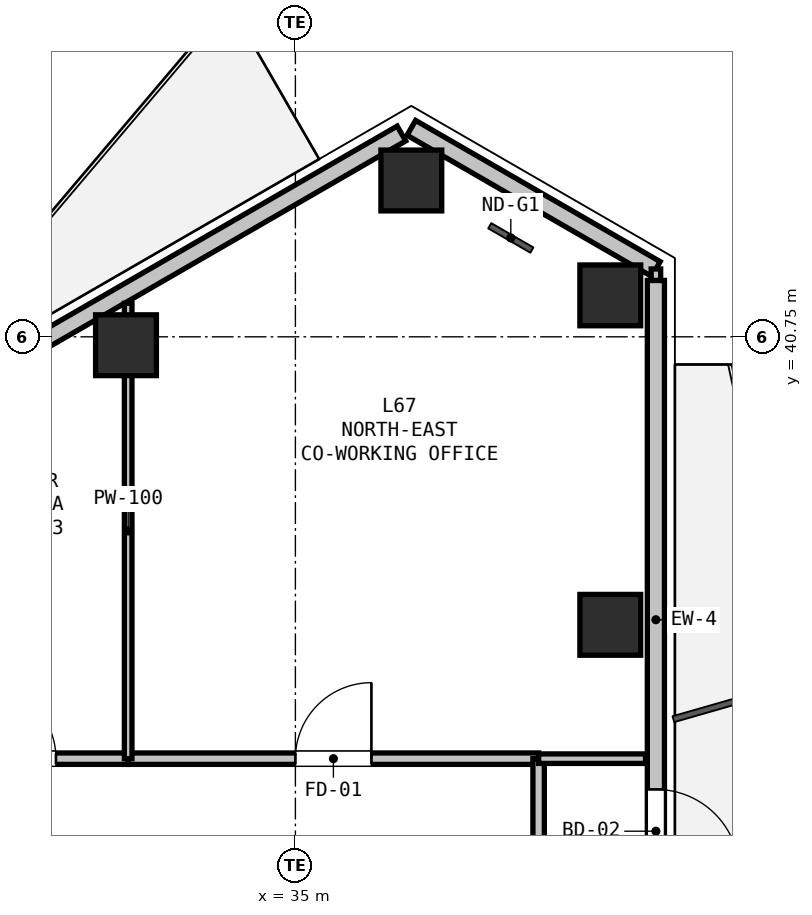
"""IFC4 building model, lengths in metres.
Left out: names, types, materials, properties, quantities, classifications, styles, units other than length and angle.
Written with IfcOpenShell. Run it as: python <this file> out.ifc"""

import sys

from ifc_helpers import new_model, si_unit, direction, frame, frame_2d, origin, origin_2d, place, context, subcontext, project, spatial, rectangle, hollow_rectangle, extrude, element, fill, save


model = new_model("IFC4")
c1 = context("Model", 3, precision=1e-05, world=origin(), true_north=direction((0.0, 1.0)))
c2 = subcontext(c1, "Body", "Model", "MODEL_VIEW")
j1 = project(units=[si_unit("LENGTHUNIT", "METRE"), si_unit("PLANEANGLEUNIT", "RADIAN")], contexts=[c1])
p1 = place(None, origin())
s1 = spatial("IfcSite", under=j1, at=p1, CompositionType="ELEMENT")
p2 = place(p1, origin())
s2 = spatial("IfcBuilding", under=s1, at=p2, CompositionType="ELEMENT")
p3 = place(p2, frame((0.0, 0.0, 239.7)))
s3 = spatial("IfcBuildingStorey", under=s2, at=p3, CompositionType="ELEMENT", Elevation=239.7)
for number, where, z_axis, x_axis in (
    (1, (32.771, 40.639, 0.0), (0.0, 0.0, 1.0), (1.0, 0.0, 0.0)),
    (2, (36.525, 42.807, 0.0), (0.0, 0.0, 1.0), (1.0, 0.0, 0.0)),
    (3, (39.143, 41.295, 0.0), (0.0, 0.0, 1.0), (1.0, 0.0, 0.0)),
    (4, (39.143, 36.961, 0.0), (0.0, 0.0, 1.0), (1.0, 0.0, 0.0)),
):
    element("IfcColumn", number, at=place(p3, frame(where, z_axis=z_axis, x_axis=x_axis)), inside=s3, PredefinedType="COLUMN", context=c2, shape_type="SweptSolid", body=[
        extrude(hollow_rectangle(XDim=0.8, YDim=0.8, WallThickness=0.025, at=origin_2d()), origin(), (0.0, 0.0, 1.0), 3.3),
    ])
p4 = place(p3, frame((36.525, 43.5, 0.0), z_axis=(0.0, 0.0, 1.0), x_axis=(0.866038962515, -0.499976514854, 0.0)))
e5 = element("IfcWall", 5, at=p4, inside=s3, PredefinedType="SOLIDWALL", context=c2, shape_type="SweptSolid", body=[
    extrude(rectangle(XDim=3.716, YDim=0.225, at=frame_2d((1.858, 0.0))), origin(), (0.0, 0.0, 1.0), 2.7),
])
p5 = place(p3, frame((28.664, 38.96, 0.0), z_axis=(0.0, 0.0, 1.0), x_axis=(0.866026655105, 0.499997832642, 0.0)))
e6 = element("IfcWall", 6, at=p5, inside=s3, PredefinedType="SOLIDWALL", context=c2, shape_type="SweptSolid", body=[
    extrude(rectangle(XDim=8.928, YDim=0.225, at=frame_2d((4.464, 0.0))), origin(), (0.0, 0.0, 1.0), 2.7),
])
p6 = place(p5, frame((1.634, 0.0, 0.9)))
e7 = element("IfcOpeningElement", 7, at=p6, cuts=e6, PredefinedType="OPENING", context=c2, shape_type="SweptSolid", body=[
    extrude(rectangle(XDim=1.5, YDim=1.5, at=frame_2d((0.75, 0.75))), frame((0.0, 0.123, 0.0), z_axis=(0.0, -1.0, 0.0), x_axis=(1.0, 0.0, 0.0)), (0.0, 0.0, 1.0), 0.245),
])
p7 = place(p3, frame((39.743, 41.492, 0.0), z_axis=(0.0, 0.0, 1.0), x_axis=(0.0, -1.0, 0.0)))
e8 = element("IfcWall", 8, at=p7, inside=s3, PredefinedType="SOLIDWALL", context=c2, shape_type="SweptSolid", body=[
    extrude(rectangle(XDim=8.928, YDim=0.225, at=frame_2d((4.464, 0.0))), origin(), (0.0, 0.0, 1.0), 2.7),
])
p8 = place(p7, frame((6.696, 0.0, 0.0)))
e9 = element("IfcOpeningElement", 9, at=p8, cuts=e8, PredefinedType="OPENING", context=c2, shape_type="SweptSolid", body=[
    extrude(rectangle(XDim=1.1, YDim=2.1, at=frame_2d((0.55, 1.05))), frame((0.0, 0.123, 0.0), z_axis=(0.0, -1.0, 0.0), x_axis=(1.0, 0.0, 0.0)), (0.0, 0.0, 1.0), 0.245),
])
p9 = place(p3, frame((29.9, 35.2, 0.0), z_axis=(0.0, 0.0, 1.0), x_axis=(1.0, 0.0, 0.0)))
e10 = element("IfcWall", 10, at=p9, inside=s3, PredefinedType="PARTITIONING", context=c2, shape_type="SweptSolid", body=[
    extrude(rectangle(XDim=2.9, YDim=0.15, at=frame_2d((1.45, 0.0))), origin(), (0.0, 0.0, 1.0), 3.08),
])
p10 = place(p9, frame((0.95, 0.0, 0.0)))
e11 = element("IfcOpeningElement", 11, at=p10, cuts=e10, PredefinedType="OPENING", context=c2, shape_type="SweptSolid", body=[
    extrude(rectangle(XDim=1.0, YDim=2.15, at=frame_2d((0.5, 1.075))), frame((0.0, 0.085, 0.0), z_axis=(0.0, -1.0, 0.0), x_axis=(1.0, 0.0, 0.0)), (0.0, 0.0, 1.0), 0.17),
])
p11 = place(p3, frame((32.8, 35.2, 0.0), z_axis=(0.0, 0.0, 1.0), x_axis=(1.0, 0.0, 0.0)))
e12 = element("IfcWall", 12, at=p11, inside=s3, PredefinedType="PARTITIONING", context=c2, shape_type="SweptSolid", body=[
    extrude(rectangle(XDim=5.4, YDim=0.15, at=frame_2d((2.7, 0.0))), origin(), (0.0, 0.0, 1.0), 2.528),
])
p12 = place(p11, frame((2.2, 0.0, 0.0)))
e13 = element("IfcOpeningElement", 13, at=p12, cuts=e12, PredefinedType="OPENING", context=c2, shape_type="SweptSolid", body=[
    extrude(rectangle(XDim=1.0, YDim=2.15, at=frame_2d((0.5, 1.075))), frame((0.0, 0.085, 0.0), z_axis=(0.0, -1.0, 0.0), x_axis=(1.0, 0.0, 0.0)), (0.0, 0.0, 1.0), 0.17),
])
p13 = place(p3, frame((38.2, 35.2, 0.0), z_axis=(0.0, 0.0, 1.0), x_axis=(0.0, -1.0, 0.0)))
e14 = element("IfcWall", 14, at=p13, inside=s3, PredefinedType="PARTITIONING", context=c2, shape_type="SweptSolid", body=[
    extrude(rectangle(XDim=1.6, YDim=0.15, at=frame_2d((0.8, 0.0))), origin(), (0.0, 0.0, 1.0), 3.08),
])
p14 = place(p3, frame((39.606, 35.2, 0.0), z_axis=(0.0, 0.0, 1.0), x_axis=(-1.0, 0.0, 0.0)))
e15 = element("IfcWall", 15, at=p14, inside=s3, PredefinedType="PARTITIONING", context=c2, shape_type="SweptSolid", body=[
    extrude(rectangle(XDim=1.406, YDim=0.125, at=frame_2d((0.703, 0.0))), origin(), (0.0, 0.0, 1.0), 2.365),
])
p15 = place(p3, frame((32.8, 35.2, 0.0), z_axis=(0.0, 0.0, 1.0), x_axis=(0.0, 1.0, 0.0)))
e16 = element("IfcWall", 16, at=p15, inside=s3, PredefinedType="PARTITIONING", context=c2, shape_type="SweptSolid", body=[
    extrude(rectangle(XDim=5.991, YDim=0.1, at=frame_2d((2.996, 0.0))), origin(), (0.0, 0.0, 1.0), 3.08),
])
p16 = place(p3, frame((39.743, 41.642, 0.0), z_axis=(0.0, 0.0, 1.0), x_axis=(0.0, -1.0, 0.0)))
e17 = element("IfcWall", 17, at=p16, inside=s3, PredefinedType="PARTITIONING", context=c2, shape_type="SweptSolid", body=[
    extrude(rectangle(XDim=0.15, YDim=0.125, at=frame_2d((0.075, 0.0))), origin(), (0.0, 0.0, 1.0), 3.08),
])
p17 = place(p8, origin())
e18 = element("IfcDoor", 18, at=p17, inside=s3, OperationType="SINGLE_SWING_RIGHT", PredefinedType="DOOR", context=c2, shape_type="SweptSolid", body=[
    extrude(rectangle(XDim=1.1, YDim=2.1, at=frame_2d((0.55, 1.05))), frame((0.0, 0.025, 0.0), z_axis=(0.0, -1.0, 0.0), x_axis=(1.0, 0.0, 0.0)), (0.0, 0.0, 1.0), 0.05),
])
fill(e9, e18)
p18 = place(p12, origin())
e19 = element("IfcDoor", 19, at=p18, inside=s3, OperationType="SINGLE_SWING_RIGHT", PredefinedType="DOOR", context=c2, shape_type="SweptSolid", body=[
    extrude(rectangle(XDim=1.0, YDim=2.15, at=frame_2d((0.5, 1.075))), frame((0.0, 0.025, 0.0), z_axis=(0.0, -1.0, 0.0), x_axis=(1.0, 0.0, 0.0)), (0.0, 0.0, 1.0), 0.05),
])
fill(e13, e19)
p19 = place(p10, origin())
e20 = element("IfcDoor", 20, at=p19, inside=s3, OperationType="SINGLE_SWING_LEFT", PredefinedType="DOOR", context=c2, shape_type="SweptSolid", body=[
    extrude(rectangle(XDim=1.0, YDim=2.15, at=frame_2d((0.5, 1.075))), frame((0.0, 0.025, 0.0), z_axis=(0.0, -1.0, 0.0), x_axis=(1.0, 0.0, 0.0)), (0.0, 0.0, 1.0), 0.05),
])
fill(e11, e20)
save(model, sys.argv[1])
